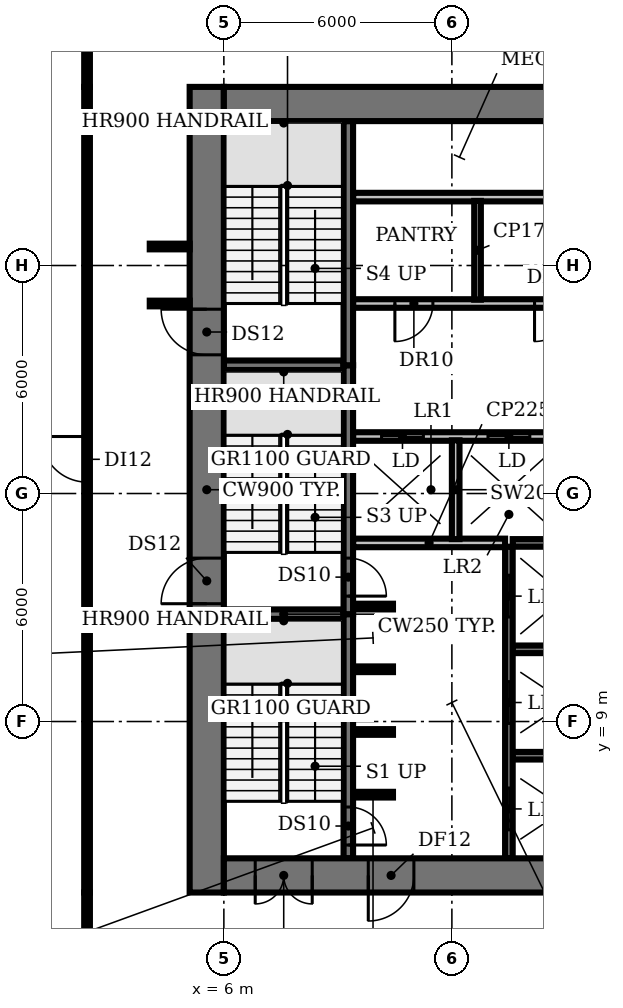
"""IFC4 building model, lengths in metres.
Left out: names, types, materials, properties, quantities, classifications, styles, units other than length and angle.
Written with IfcOpenShell. Run it as: python <this file> out.ifc"""

import sys

from ifc_helpers import new_model, si_unit, direction, frame, frame_2d, origin, place, context, subcontext, project, spatial, rectangle, extrude, element, fill, save


model = new_model("IFC4")
c1 = context("Model", 3, precision=1e-05, world=origin(), true_north=direction((0.0, 1.0)))
c2 = subcontext(c1, "Body", "Model", "MODEL_VIEW")
j1 = project(units=[si_unit("LENGTHUNIT", "METRE"), si_unit("PLANEANGLEUNIT", "RADIAN")], contexts=[c1])
p1 = place(None, origin())
s1 = spatial("IfcSite", under=j1, at=p1, CompositionType="ELEMENT")
p2 = place(p1, origin())
s2 = spatial("IfcBuilding", under=s1, at=p2, CompositionType="ELEMENT")
p3 = place(p2, frame((0.0, 0.0, 20.0)))
s3 = spatial("IfcBuildingStorey", under=s2, at=p3, CompositionType="ELEMENT", Elevation=20.0)
p4 = place(p3, frame((9.4, 7.075, 0.0), z_axis=(0.0, 0.0, 1.0), x_axis=(1.0, 0.0, 0.0)))
e1 = element("IfcWall", 1, at=p4, inside=s3, PredefinedType="SHEAR", context=c2, shape_type="SweptSolid", body=[
    extrude(rectangle(XDim=1.05, YDim=0.15, at=frame_2d((0.525, 0.0))), origin(), (0.0, 0.0, 1.0), 4.15),
])
p5 = place(p3, frame((13.6, 8.1, 0.0), z_axis=(0.0, 0.0, 1.0), x_axis=(1.0, 0.0, 0.0)))
e2 = element("IfcWall", 2, at=p5, inside=s3, PredefinedType="SHEAR", context=c2, shape_type="SweptSolid", body=[
    extrude(rectangle(XDim=2.8, YDim=0.2, at=frame_2d((1.4, 0.0))), origin(), (0.0, 0.0, 1.0), 4.15),
])
for number, where, z_axis, x_axis in (
    (3, (9.4, 8.725, 0.0), (0.0, 0.0, 1.0), (1.0, 0.0, 0.0)),
    (4, (9.4, 10.375, 0.0), (0.0, 0.0, 1.0), (1.0, 0.0, 0.0)),
):
    element("IfcWall", number, at=place(p3, frame(where, z_axis=z_axis, x_axis=x_axis)), inside=s3, PredefinedType="SHEAR", context=c2, shape_type="SweptSolid", body=[
        extrude(rectangle(XDim=1.05, YDim=0.15, at=frame_2d((0.525, 0.0))), origin(), (0.0, 0.0, 1.0), 4.15),
    ])
p6 = place(p3, frame((13.6, 10.9, 0.0), z_axis=(0.0, 0.0, 1.0), x_axis=(1.0, 0.0, 0.0)))
e5 = element("IfcWall", 5, at=p6, inside=s3, PredefinedType="SHEAR", context=c2, shape_type="SweptSolid", body=[
    extrude(rectangle(XDim=2.8, YDim=0.2, at=frame_2d((1.4, 0.0))), origin(), (0.0, 0.0, 1.0), 4.15),
])
p7 = place(p3, frame((6.0, 11.825, 0.0), z_axis=(0.0, 0.0, 1.0), x_axis=(1.0, 0.0, 0.0)))
e6 = element("IfcWall", 6, at=p7, inside=s3, PredefinedType="SHEAR", context=c2, shape_type="SweptSolid", body=[
    extrude(rectangle(XDim=3.15, YDim=0.25, at=frame_2d((1.575, 0.0))), origin(), (0.0, 0.0, 1.0), 4.15),
])
p8 = place(p3, frame((9.4, 12.025, 0.0), z_axis=(0.0, 0.0, 1.0), x_axis=(1.0, 0.0, 0.0)))
e7 = element("IfcWall", 7, at=p8, inside=s3, PredefinedType="SHEAR", context=c2, shape_type="SweptSolid", body=[
    extrude(rectangle(XDim=1.05, YDim=0.15, at=frame_2d((0.525, 0.0))), origin(), (0.0, 0.0, 1.0), 4.15),
])
p9 = place(p3, frame((9.4, 13.7, 0.0), z_axis=(0.0, 0.0, 1.0), x_axis=(1.0, 0.0, 0.0)))
e8 = element("IfcWall", 8, at=p9, inside=s3, PredefinedType="PARTITIONING", context=c2, shape_type="SweptSolid", body=[
    extrude(rectangle(XDim=4.0, YDim=0.225, at=frame_2d((2.0, 0.0))), origin(), (0.0, 0.0, 1.0), 4.15),
])
p10 = place(p3, frame((13.6, 13.7, 0.0), z_axis=(0.0, 0.0, 1.0), x_axis=(1.0, 0.0, 0.0)))
e9 = element("IfcWall", 9, at=p10, inside=s3, PredefinedType="SHEAR", context=c2, shape_type="SweptSolid", body=[
    extrude(rectangle(XDim=2.8, YDim=0.2, at=frame_2d((1.4, 0.0))), origin(), (0.0, 0.0, 1.0), 4.15),
])
p11 = place(p3, frame((9.4, 16.5, 0.0), z_axis=(0.0, 0.0, 1.0), x_axis=(1.0, 0.0, 0.0)))
e10 = element("IfcWall", 10, at=p11, inside=s3, PredefinedType="PARTITIONING", context=c2, shape_type="SweptSolid", body=[
    extrude(rectangle(XDim=14.6, YDim=0.225, at=frame_2d((7.3, 0.0))), origin(), (0.0, 0.0, 1.0), 4.15),
])
p12 = place(p11, frame((0.75, 0.0, 0.0)))
e11 = element("IfcOpeningElement", 11, at=p12, cuts=e10, PredefinedType="OPENING", context=c2, shape_type="SweptSolid", body=[
    extrude(rectangle(XDim=1.1, YDim=2.1, at=frame_2d((0.55, 1.05))), frame((0.0, 0.123, 0.0), z_axis=(0.0, -1.0, 0.0), x_axis=(1.0, 0.0, 0.0)), (0.0, 0.0, 1.0), 0.245),
])
p13 = place(p11, frame((3.55, 0.0, 0.0)))
e12 = element("IfcOpeningElement", 12, at=p13, cuts=e10, PredefinedType="OPENING", context=c2, shape_type="SweptSolid", body=[
    extrude(rectangle(XDim=1.1, YDim=2.1, at=frame_2d((0.55, 1.05))), frame((0.0, 0.123, 0.0), z_axis=(0.0, -1.0, 0.0), x_axis=(1.0, 0.0, 0.0)), (0.0, 0.0, 1.0), 0.245),
])
p14 = place(p11, frame((6.35, 0.0, 0.0)))
e13 = element("IfcOpeningElement", 13, at=p14, cuts=e10, PredefinedType="OPENING", context=c2, shape_type="SweptSolid", body=[
    extrude(rectangle(XDim=1.1, YDim=2.1, at=frame_2d((0.55, 1.05))), frame((0.0, 0.123, 0.0), z_axis=(0.0, -1.0, 0.0), x_axis=(1.0, 0.0, 0.0)), (0.0, 0.0, 1.0), 0.245),
])
p15 = place(p11, frame((9.15, 0.0, 0.0)))
e14 = element("IfcOpeningElement", 14, at=p15, cuts=e10, PredefinedType="OPENING", context=c2, shape_type="SweptSolid", body=[
    extrude(rectangle(XDim=1.1, YDim=2.1, at=frame_2d((0.55, 1.05))), frame((0.0, 0.123, 0.0), z_axis=(0.0, -1.0, 0.0), x_axis=(1.0, 0.0, 0.0)), (0.0, 0.0, 1.0), 0.245),
])
p16 = place(p11, frame((11.647, 0.0, 0.0)))
e15 = element("IfcOpeningElement", 15, at=p16, cuts=e10, PredefinedType="OPENING", context=c2, shape_type="SweptSolid", body=[
    extrude(rectangle(XDim=0.9, YDim=2.1, at=frame_2d((0.45, 1.05))), frame((0.0, 0.123, 0.0), z_axis=(0.0, -1.0, 0.0), x_axis=(1.0, 0.0, 0.0)), (0.0, 0.0, 1.0), 0.245),
])
p17 = place(p11, frame((13.423, 0.0, 0.0)))
e16 = element("IfcOpeningElement", 16, at=p17, cuts=e10, PredefinedType="OPENING", context=c2, shape_type="SweptSolid", body=[
    extrude(rectangle(XDim=0.9, YDim=2.1, at=frame_2d((0.45, 1.05))), frame((0.0, 0.123, 0.0), z_axis=(0.0, -1.0, 0.0), x_axis=(1.0, 0.0, 0.0)), (0.0, 0.0, 1.0), 0.245),
])
p18 = place(p3, frame((6.0, 18.375, 0.0), z_axis=(0.0, 0.0, 1.0), x_axis=(1.0, 0.0, 0.0)))
e17 = element("IfcWall", 17, at=p18, inside=s3, PredefinedType="SHEAR", context=c2, shape_type="SweptSolid", body=[
    extrude(rectangle(XDim=3.15, YDim=0.25, at=frame_2d((1.575, 0.0))), origin(), (0.0, 0.0, 1.0), 4.15),
])
p19 = place(p3, frame((24.0, 20.0, 0.0), z_axis=(0.0, 0.0, 1.0), x_axis=(-1.0, 0.0, 0.0)))
e18 = element("IfcWall", 18, at=p19, inside=s3, PredefinedType="PARTITIONING", context=c2, shape_type="SweptSolid", body=[
    extrude(rectangle(XDim=14.6, YDim=0.225, at=frame_2d((7.3, 0.0))), origin(), (0.0, 0.0, 1.0), 4.15),
])
p20 = place(p19, frame((12.5, 0.0, 0.0)))
e19 = element("IfcOpeningElement", 19, at=p20, cuts=e18, PredefinedType="OPENING", context=c2, shape_type="SweptSolid", body=[
    extrude(rectangle(XDim=1.0, YDim=2.1, at=frame_2d((0.5, 1.05))), frame((0.0, 0.123, 0.0), z_axis=(0.0, -1.0, 0.0), x_axis=(1.0, 0.0, 0.0)), (0.0, 0.0, 1.0), 0.245),
])
p21 = place(p19, frame((8.825, 0.0, 0.0)))
e20 = element("IfcOpeningElement", 20, at=p21, cuts=e18, PredefinedType="OPENING", context=c2, shape_type="SweptSolid", body=[
    extrude(rectangle(XDim=1.0, YDim=2.1, at=frame_2d((0.5, 1.05))), frame((0.0, 0.123, 0.0), z_axis=(0.0, -1.0, 0.0), x_axis=(1.0, 0.0, 0.0)), (0.0, 0.0, 1.0), 0.245),
])
p22 = place(p19, frame((4.925, 0.0, 0.0)))
e21 = element("IfcOpeningElement", 21, at=p22, cuts=e18, PredefinedType="OPENING", context=c2, shape_type="SweptSolid", body=[
    extrude(rectangle(XDim=1.0, YDim=2.1, at=frame_2d((0.5, 1.05))), frame((0.0, 0.123, 0.0), z_axis=(0.0, -1.0, 0.0), x_axis=(1.0, 0.0, 0.0)), (0.0, 0.0, 1.0), 0.245),
])
p23 = place(p19, frame((2.137, 0.0, 0.0)))
e22 = element("IfcOpeningElement", 22, at=p23, cuts=e18, PredefinedType="OPENING", context=c2, shape_type="SweptSolid", body=[
    extrude(rectangle(XDim=0.9, YDim=2.1, at=frame_2d((0.45, 1.05))), frame((0.0, 0.123, 0.0), z_axis=(0.0, -1.0, 0.0), x_axis=(1.0, 0.0, 0.0)), (0.0, 0.0, 1.0), 0.245),
])
p24 = place(p19, frame((0.363, 0.0, 0.0)))
e23 = element("IfcOpeningElement", 23, at=p24, cuts=e18, PredefinedType="OPENING", context=c2, shape_type="SweptSolid", body=[
    extrude(rectangle(XDim=0.9, YDim=2.1, at=frame_2d((0.45, 1.05))), frame((0.0, 0.123, 0.0), z_axis=(0.0, -1.0, 0.0), x_axis=(1.0, 0.0, 0.0)), (0.0, 0.0, 1.0), 0.245),
])
p25 = place(p3, frame((9.4, 22.8, 0.0), z_axis=(0.0, 0.0, 1.0), x_axis=(1.0, 0.0, 0.0)))
e24 = element("IfcWall", 24, at=p25, inside=s3, PredefinedType="PARTITIONING", context=c2, shape_type="SweptSolid", body=[
    extrude(rectangle(XDim=14.6, YDim=0.225, at=frame_2d((7.3, 0.0))), origin(), (0.0, 0.0, 1.0), 4.15),
])
p26 = place(p3, frame((9.275, 11.825, 0.0), z_axis=(0.0, 0.0, 1.0), x_axis=(0.0, -1.0, 0.0)))
e25 = element("IfcWall", 25, at=p26, inside=s3, PredefinedType="SHEAR", context=c2, shape_type="SweptSolid", body=[
    extrude(rectangle(XDim=6.425, YDim=0.25, at=frame_2d((3.212, 0.0))), origin(), (0.0, 0.0, 1.0), 4.15),
])
p27 = place(p26, frame((5.075, 0.0, 0.0)))
e26 = element("IfcOpeningElement", 26, at=p27, cuts=e25, PredefinedType="OPENING", context=c2, shape_type="SweptSolid", body=[
    extrude(rectangle(XDim=1.0, YDim=2.1, at=frame_2d((0.5, 1.05))), frame((0.0, 0.135, 0.0), z_axis=(0.0, -1.0, 0.0), x_axis=(1.0, 0.0, 0.0)), (0.0, 0.0, 1.0), 0.27),
])
p28 = place(p3, frame((9.275, 18.375, 0.0), z_axis=(0.0, 0.0, 1.0), x_axis=(0.0, -1.0, 0.0)))
e27 = element("IfcWall", 27, at=p28, inside=s3, PredefinedType="SHEAR", context=c2, shape_type="SweptSolid", body=[
    extrude(rectangle(XDim=6.55, YDim=0.25, at=frame_2d((3.275, 0.0))), origin(), (0.0, 0.0, 1.0), 4.15),
])
p29 = place(p28, frame((5.075, 0.0, 0.0)))
e28 = element("IfcOpeningElement", 28, at=p29, cuts=e27, PredefinedType="OPENING", context=c2, shape_type="SweptSolid", body=[
    extrude(rectangle(XDim=1.0, YDim=2.1, at=frame_2d((0.5, 1.05))), frame((0.0, 0.135, 0.0), z_axis=(0.0, -1.0, 0.0), x_axis=(1.0, 0.0, 0.0)), (0.0, 0.0, 1.0), 0.27),
])
p30 = place(p3, frame((9.275, 18.375, 0.0), z_axis=(0.0, 0.0, 1.0), x_axis=(0.0, 1.0, 0.0)))
e29 = element("IfcWall", 29, at=p30, inside=s3, PredefinedType="SHEAR", context=c2, shape_type="SweptSolid", body=[
    extrude(rectangle(XDim=6.425, YDim=0.25, at=frame_2d((3.212, 0.0))), origin(), (0.0, 0.0, 1.0), 4.15),
])
p31 = place(p3, frame((12.1, 13.8, 0.0), z_axis=(0.0, 0.0, 1.0), x_axis=(0.0, 1.0, 0.0)))
e30 = element("IfcWall", 30, at=p31, inside=s3, PredefinedType="SOLIDWALL", context=c2, shape_type="SweptSolid", body=[
    extrude(rectangle(XDim=2.6, YDim=0.2, at=frame_2d((1.3, 0.0))), origin(), (0.0, 0.0, 1.0), 4.15),
])
p32 = place(p3, frame((12.675, 20.1, 0.0), z_axis=(0.0, 0.0, 1.0), x_axis=(0.0, 1.0, 0.0)))
e31 = element("IfcWall", 31, at=p32, inside=s3, PredefinedType="PARTITIONING", context=c2, shape_type="SweptSolid", body=[
    extrude(rectangle(XDim=2.6, YDim=0.175, at=frame_2d((1.3, 0.0))), origin(), (0.0, 0.0, 1.0), 4.15),
])
p33 = place(p3, frame((13.5, 5.4, 0.0), z_axis=(0.0, 0.0, 1.0), x_axis=(0.0, 1.0, 0.0)))
e32 = element("IfcWall", 32, at=p33, inside=s3, PredefinedType="SHEAR", context=c2, shape_type="SweptSolid", body=[
    extrude(rectangle(XDim=8.2, YDim=0.2, at=frame_2d((4.1, 0.0))), origin(), (0.0, 0.0, 1.0), 4.15),
])
p34 = place(p33, frame((0.75, 0.0, 0.0)))
e33 = element("IfcOpeningElement", 33, at=p34, cuts=e32, PredefinedType="OPENING", context=c2, shape_type="SweptSolid", body=[
    extrude(rectangle(XDim=1.1, YDim=2.1, at=frame_2d((0.55, 1.05))), frame((0.0, 0.11, 0.0), z_axis=(0.0, -1.0, 0.0), x_axis=(1.0, 0.0, 0.0)), (0.0, 0.0, 1.0), 0.22),
])
p35 = place(p33, frame((3.55, 0.0, 0.0)))
e34 = element("IfcOpeningElement", 34, at=p35, cuts=e32, PredefinedType="OPENING", context=c2, shape_type="SweptSolid", body=[
    extrude(rectangle(XDim=1.1, YDim=2.1, at=frame_2d((0.55, 1.05))), frame((0.0, 0.11, 0.0), z_axis=(0.0, -1.0, 0.0), x_axis=(1.0, 0.0, 0.0)), (0.0, 0.0, 1.0), 0.22),
])
p36 = place(p33, frame((6.35, 0.0, 0.0)))
e35 = element("IfcOpeningElement", 35, at=p36, cuts=e32, PredefinedType="OPENING", context=c2, shape_type="SweptSolid", body=[
    extrude(rectangle(XDim=1.1, YDim=2.1, at=frame_2d((0.55, 1.05))), frame((0.0, 0.11, 0.0), z_axis=(0.0, -1.0, 0.0), x_axis=(1.0, 0.0, 0.0)), (0.0, 0.0, 1.0), 0.22),
])
p37 = place(p3, frame((5.55, 4.5, 0.0), z_axis=(0.0, 0.0, 1.0), x_axis=(0.0, 1.0, 0.0)))
e36 = element("IfcWall", 36, at=p37, inside=s3, PredefinedType="SHEAR", context=c2, shape_type="SweptSolid", body=[
    extrude(rectangle(XDim=21.2, YDim=0.9, at=frame_2d((10.6, 0.0))), origin(), (0.0, 0.0, 1.0), 4.15),
])
p38 = place(p37, frame((7.6, 0.0, 0.0)))
e37 = element("IfcOpeningElement", 37, at=p38, cuts=e36, PredefinedType="OPENING", context=c2, shape_type="SweptSolid", body=[
    extrude(rectangle(XDim=1.2, YDim=2.1, at=frame_2d((0.6, 1.05))), frame((0.0, 0.46, 0.0), z_axis=(0.0, -1.0, 0.0), x_axis=(1.0, 0.0, 0.0)), (0.0, 0.0, 1.0), 0.92),
])
p39 = place(p37, frame((14.15, 0.0, 0.0)))
e38 = element("IfcOpeningElement", 38, at=p39, cuts=e36, PredefinedType="OPENING", context=c2, shape_type="SweptSolid", body=[
    extrude(rectangle(XDim=1.2, YDim=2.1, at=frame_2d((0.6, 1.05))), frame((0.0, 0.46, 0.0), z_axis=(0.0, -1.0, 0.0), x_axis=(1.0, 0.0, 0.0)), (0.0, 0.0, 1.0), 0.92),
])
p40 = place(p3, frame((24.0, 4.95, 0.0), z_axis=(0.0, 0.0, 1.0), x_axis=(-1.0, 0.0, 0.0)))
e39 = element("IfcWall", 39, at=p40, inside=s3, PredefinedType="SHEAR", context=c2, shape_type="SweptSolid", body=[
    extrude(rectangle(XDim=18.0, YDim=0.9, at=frame_2d((9.0, 0.0))), origin(), (0.0, 0.0, 1.0), 4.15),
])
p41 = place(p40, frame((15.675, 0.0, 0.0)))
e40 = element("IfcOpeningElement", 40, at=p41, cuts=e39, PredefinedType="OPENING", context=c2, shape_type="SweptSolid", body=[
    extrude(rectangle(XDim=1.5, YDim=2.1, at=frame_2d((0.75, 1.05))), frame((0.0, 0.46, 0.0), z_axis=(0.0, -1.0, 0.0), x_axis=(1.0, 0.0, 0.0)), (0.0, 0.0, 1.0), 0.92),
])
p42 = place(p40, frame((0.825, 0.0, 0.0)))
e41 = element("IfcOpeningElement", 41, at=p42, cuts=e39, PredefinedType="OPENING", context=c2, shape_type="SweptSolid", body=[
    extrude(rectangle(XDim=1.5, YDim=2.1, at=frame_2d((0.75, 1.05))), frame((0.0, 0.46, 0.0), z_axis=(0.0, -1.0, 0.0), x_axis=(1.0, 0.0, 0.0)), (0.0, 0.0, 1.0), 0.92),
])
p43 = place(p40, frame((13.0, 0.0, 0.0)))
e42 = element("IfcOpeningElement", 42, at=p43, cuts=e39, PredefinedType="OPENING", context=c2, shape_type="SweptSolid", body=[
    extrude(rectangle(XDim=1.2, YDim=2.1, at=frame_2d((0.6, 1.05))), frame((0.0, 0.46, 0.0), z_axis=(0.0, -1.0, 0.0), x_axis=(1.0, 0.0, 0.0)), (0.0, 0.0, 1.0), 0.92),
])
p44 = place(p40, frame((4.9, 0.0, 0.0)))
e43 = element("IfcOpeningElement", 43, at=p44, cuts=e39, PredefinedType="OPENING", context=c2, shape_type="SweptSolid", body=[
    extrude(rectangle(XDim=1.0, YDim=2.1, at=frame_2d((0.5, 1.05))), frame((0.0, 0.46, 0.0), z_axis=(0.0, -1.0, 0.0), x_axis=(1.0, 0.0, 0.0)), (0.0, 0.0, 1.0), 0.92),
])
p45 = place(p3, frame((6.0, 25.25, 0.0), z_axis=(0.0, 0.0, 1.0), x_axis=(1.0, 0.0, 0.0)))
e44 = element("IfcWall", 44, at=p45, inside=s3, PredefinedType="SHEAR", context=c2, shape_type="SweptSolid", body=[
    extrude(rectangle(XDim=18.0, YDim=0.9, at=frame_2d((9.0, 0.0))), origin(), (0.0, 0.0, 1.0), 4.15),
])
p46 = place(p3, frame((2.4, 0.6, 0.0), z_axis=(0.0, 0.0, 1.0), x_axis=(0.0, 1.0, 0.0)))
e45 = element("IfcWall", 45, at=p46, inside=s3, PredefinedType="PARTITIONING", context=c2, shape_type="SweptSolid", body=[
    extrude(rectangle(XDim=3.9, YDim=0.15, at=frame_2d((1.95, 0.0))), origin(), (0.0, 0.0, 1.0), 3.08),
])
p47 = place(p3, frame((2.4, 4.5, 0.0), z_axis=(0.0, 0.0, 1.0), x_axis=(0.0, 1.0, 0.0)))
e46 = element("IfcWall", 46, at=p47, inside=s3, PredefinedType="PARTITIONING", context=c2, shape_type="SweptSolid", body=[
    extrude(rectangle(XDim=21.2, YDim=0.15, at=frame_2d((10.6, 0.0))), origin(), (0.0, 0.0, 1.0), 3.08),
])
p48 = place(p47, frame((10.8, 0.0, 0.0)))
e47 = element("IfcOpeningElement", 47, at=p48, cuts=e46, PredefinedType="OPENING", context=c2, shape_type="SweptSolid", body=[
    extrude(rectangle(XDim=1.2, YDim=2.1, at=frame_2d((0.6, 1.05))), frame((0.0, 0.085, 0.0), z_axis=(0.0, -1.0, 0.0), x_axis=(1.0, 0.0, 0.0)), (0.0, 0.0, 1.0), 0.17),
])
p49 = place(p3, frame((2.4, 25.7, 0.0), z_axis=(0.0, 0.0, 1.0), x_axis=(0.0, 1.0, 0.0)))
e48 = element("IfcWall", 48, at=p49, inside=s3, PredefinedType="PARTITIONING", context=c2, shape_type="SweptSolid", body=[
    extrude(rectangle(XDim=3.9, YDim=0.15, at=frame_2d((1.95, 0.0))), origin(), (0.0, 0.0, 1.0), 3.08),
])
for number, where, z_axis, x_axis in (
    (49, (4.05, 20.0, 0.0), (0.0, 0.0, 1.0), (1.0, 0.0, 0.0)),
    (50, (4.05, 21.5, 0.0), (0.0, 0.0, 1.0), (1.0, 0.0, 0.0)),
):
    element("IfcWall", number, at=place(p3, frame(where, z_axis=z_axis, x_axis=x_axis)), inside=s3, PredefinedType="PARTITIONING", context=c2, shape_type="SweptSolid", body=[
        extrude(rectangle(XDim=1.05, YDim=0.15, at=frame_2d((0.525, 0.0))), origin(), (0.0, 0.0, 1.0), 3.08),
    ])
p50 = place(p12, origin())
e51 = element("IfcDoor", 51, at=p50, inside=s3, OperationType="DOUBLE_DOOR_SLIDING", PredefinedType="DOOR", context=c2, shape_type="SweptSolid", body=[
    extrude(rectangle(XDim=1.1, YDim=2.1, at=frame_2d((0.55, 1.05))), frame((0.0, 0.025, 0.0), z_axis=(0.0, -1.0, 0.0), x_axis=(1.0, 0.0, 0.0)), (0.0, 0.0, 1.0), 0.05),
])
fill(e11, e51)
p51 = place(p13, origin())
e52 = element("IfcDoor", 52, at=p51, inside=s3, OperationType="DOUBLE_DOOR_SLIDING", PredefinedType="DOOR", context=c2, shape_type="SweptSolid", body=[
    extrude(rectangle(XDim=1.1, YDim=2.1, at=frame_2d((0.55, 1.05))), frame((0.0, 0.025, 0.0), z_axis=(0.0, -1.0, 0.0), x_axis=(1.0, 0.0, 0.0)), (0.0, 0.0, 1.0), 0.05),
])
fill(e12, e52)
p52 = place(p20, origin())
e53 = element("IfcDoor", 53, at=p52, inside=s3, OperationType="SINGLE_SWING_RIGHT", PredefinedType="DOOR", context=c2, shape_type="SweptSolid", body=[
    extrude(rectangle(XDim=1.0, YDim=2.1, at=frame_2d((0.5, 1.05))), frame((0.0, 0.025, 0.0), z_axis=(0.0, -1.0, 0.0), x_axis=(1.0, 0.0, 0.0)), (0.0, 0.0, 1.0), 0.05),
])
fill(e19, e53)
p53 = place(p21, origin())
e54 = element("IfcDoor", 54, at=p53, inside=s3, OperationType="SINGLE_SWING_RIGHT", PredefinedType="DOOR", context=c2, shape_type="SweptSolid", body=[
    extrude(rectangle(XDim=1.0, YDim=2.1, at=frame_2d((0.5, 1.05))), frame((0.0, 0.025, 0.0), z_axis=(0.0, -1.0, 0.0), x_axis=(1.0, 0.0, 0.0)), (0.0, 0.0, 1.0), 0.05),
])
fill(e20, e54)
p54 = place(p27, origin())
e55 = element("IfcDoor", 55, at=p54, inside=s3, OperationType="SINGLE_SWING_RIGHT", PredefinedType="DOOR", context=c2, shape_type="SweptSolid", body=[
    extrude(rectangle(XDim=1.0, YDim=2.1, at=frame_2d((0.5, 1.05))), frame((0.0, 0.025, 0.0), z_axis=(0.0, -1.0, 0.0), x_axis=(1.0, 0.0, 0.0)), (0.0, 0.0, 1.0), 0.05),
])
fill(e26, e55)
p55 = place(p29, origin())
e56 = element("IfcDoor", 56, at=p55, inside=s3, OperationType="SINGLE_SWING_RIGHT", PredefinedType="DOOR", context=c2, shape_type="SweptSolid", body=[
    extrude(rectangle(XDim=1.0, YDim=2.1, at=frame_2d((0.5, 1.05))), frame((0.0, 0.025, 0.0), z_axis=(0.0, -1.0, 0.0), x_axis=(1.0, 0.0, 0.0)), (0.0, 0.0, 1.0), 0.05),
])
fill(e28, e56)
p56 = place(p34, origin())
e57 = element("IfcDoor", 57, at=p56, inside=s3, OperationType="DOUBLE_DOOR_SLIDING", PredefinedType="DOOR", context=c2, shape_type="SweptSolid", body=[
    extrude(rectangle(XDim=1.1, YDim=2.1, at=frame_2d((0.55, 1.05))), frame((0.0, 0.025, 0.0), z_axis=(0.0, -1.0, 0.0), x_axis=(1.0, 0.0, 0.0)), (0.0, 0.0, 1.0), 0.05),
])
fill(e33, e57)
p57 = place(p35, origin())
e58 = element("IfcDoor", 58, at=p57, inside=s3, OperationType="DOUBLE_DOOR_SLIDING", PredefinedType="DOOR", context=c2, shape_type="SweptSolid", body=[
    extrude(rectangle(XDim=1.1, YDim=2.1, at=frame_2d((0.55, 1.05))), frame((0.0, 0.025, 0.0), z_axis=(0.0, -1.0, 0.0), x_axis=(1.0, 0.0, 0.0)), (0.0, 0.0, 1.0), 0.05),
])
fill(e34, e58)
p58 = place(p36, origin())
e59 = element("IfcDoor", 59, at=p58, inside=s3, OperationType="DOUBLE_DOOR_SLIDING", PredefinedType="DOOR", context=c2, shape_type="SweptSolid", body=[
    extrude(rectangle(XDim=1.1, YDim=2.1, at=frame_2d((0.55, 1.05))), frame((0.0, 0.025, 0.0), z_axis=(0.0, -1.0, 0.0), x_axis=(1.0, 0.0, 0.0)), (0.0, 0.0, 1.0), 0.05),
])
fill(e35, e59)
p59 = place(p38, origin())
e60 = element("IfcDoor", 60, at=p59, inside=s3, OperationType="SINGLE_SWING_LEFT", PredefinedType="DOOR", context=c2, shape_type="SweptSolid", body=[
    extrude(rectangle(XDim=1.2, YDim=2.1, at=frame_2d((0.6, 1.05))), frame((0.0, 0.025, 0.0), z_axis=(0.0, -1.0, 0.0), x_axis=(1.0, 0.0, 0.0)), (0.0, 0.0, 1.0), 0.05),
])
fill(e37, e60)
p60 = place(p39, origin())
e61 = element("IfcDoor", 61, at=p60, inside=s3, OperationType="SINGLE_SWING_RIGHT", PredefinedType="DOOR", context=c2, shape_type="SweptSolid", body=[
    extrude(rectangle(XDim=1.2, YDim=2.1, at=frame_2d((0.6, 1.05))), frame((0.0, 0.025, 0.0), z_axis=(0.0, -1.0, 0.0), x_axis=(1.0, 0.0, 0.0)), (0.0, 0.0, 1.0), 0.05),
])
fill(e38, e61)
p61 = place(p41, origin())
e62 = element("IfcDoor", 62, at=p61, inside=s3, OperationType="DOUBLE_DOOR_SINGLE_SWING", PredefinedType="DOOR", context=c2, shape_type="SweptSolid", body=[
    extrude(rectangle(XDim=1.5, YDim=2.1, at=frame_2d((0.75, 1.05))), frame((0.0, 0.025, 0.0), z_axis=(0.0, -1.0, 0.0), x_axis=(1.0, 0.0, 0.0)), (0.0, 0.0, 1.0), 0.05),
])
fill(e40, e62)
p62 = place(p43, origin())
e63 = element("IfcDoor", 63, at=p62, inside=s3, OperationType="SINGLE_SWING_RIGHT", PredefinedType="DOOR", context=c2, shape_type="SweptSolid", body=[
    extrude(rectangle(XDim=1.2, YDim=2.1, at=frame_2d((0.6, 1.05))), frame((0.0, 0.025, 0.0), z_axis=(0.0, -1.0, 0.0), x_axis=(1.0, 0.0, 0.0)), (0.0, 0.0, 1.0), 0.05),
])
fill(e42, e63)
p63 = place(p48, origin())
e64 = element("IfcDoor", 64, at=p63, inside=s3, OperationType="SINGLE_SWING_RIGHT", PredefinedType="DOOR", context=c2, shape_type="SweptSolid", body=[
    extrude(rectangle(XDim=1.2, YDim=2.1, at=frame_2d((0.6, 1.05))), frame((0.0, 0.025, 0.0), z_axis=(0.0, -1.0, 0.0), x_axis=(1.0, 0.0, 0.0)), (0.0, 0.0, 1.0), 0.05),
])
fill(e47, e64)
save(model, sys.argv[1])
